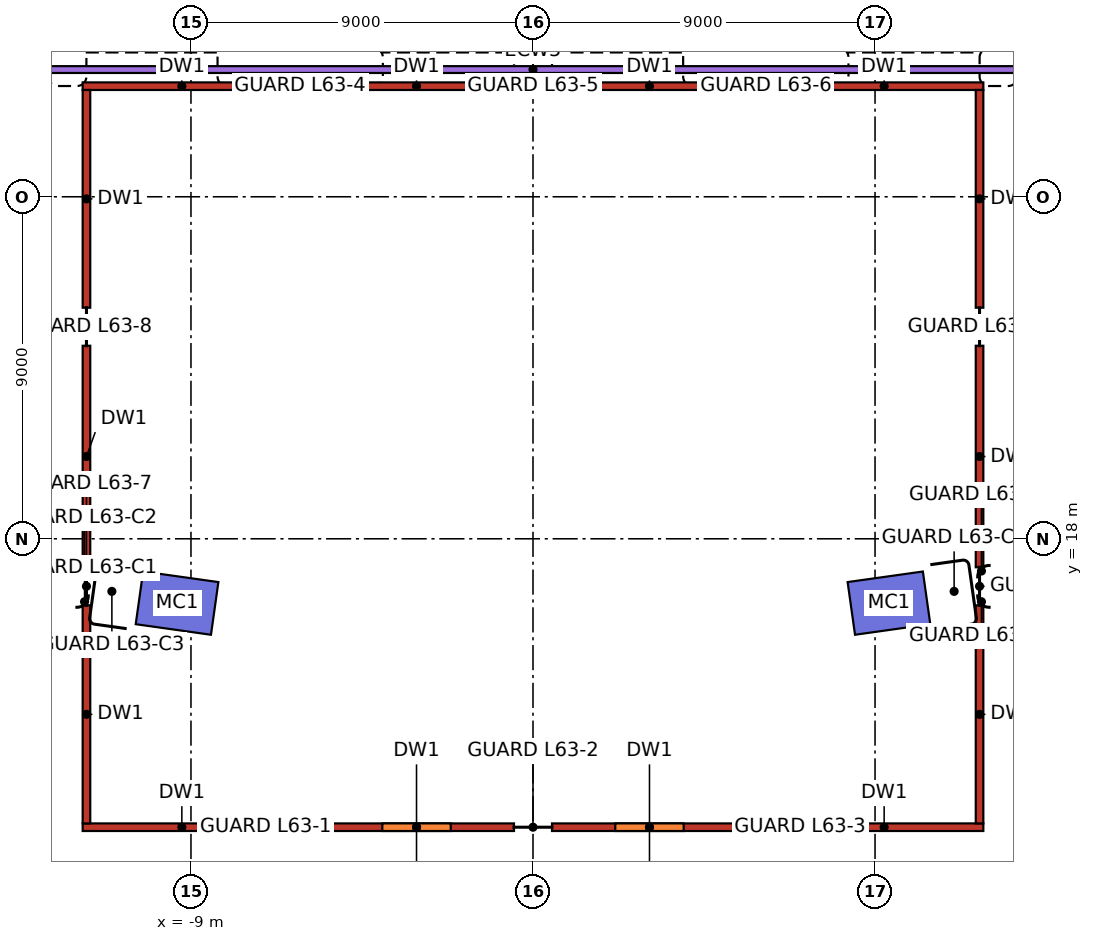
"""IFC4 building model, lengths in metres.
Left out: names, types, materials, properties, quantities, classifications, styles, units other than length and angle.
Written with IfcOpenShell. Run it as: python <this file> out.ifc"""

import sys

from ifc_helpers import new_model, si_unit, direction, frame, frame_2d, origin, origin_2d, place, context, subcontext, project, spatial, rectangle, hollow_rectangle, extrude, element, fill, save


model = new_model("IFC4")
c1 = context("Model", 3, precision=1e-05, world=origin(), true_north=direction((0.0, 1.0)))
c2 = subcontext(c1, "Body", "Model", "MODEL_VIEW")
j1 = project(units=[si_unit("LENGTHUNIT", "METRE"), si_unit("PLANEANGLEUNIT", "RADIAN")], contexts=[c1])
p1 = place(None, origin())
s1 = spatial("IfcSite", under=j1, at=p1, CompositionType="ELEMENT")
p2 = place(p1, origin())
s2 = spatial("IfcBuilding", under=s1, at=p2, CompositionType="ELEMENT")
p3 = place(p2, frame((0.0, 0.0, 262.2)))
s3 = spatial("IfcBuildingStorey", under=s2, at=p3, CompositionType="ELEMENT", Elevation=262.2)
for number, where, z_axis, x_axis in (
    (1, (-9.366, 16.306, 0.0), (0.0, 0.0, 1.0), (-0.99, 0.139, 0.0)),
    (2, (9.366, 16.306, 0.0), (0.0, 0.0, 1.0), (0.99, 0.139, 0.0)),
):
    element("IfcColumn", number, at=place(p3, frame(where, z_axis=z_axis, x_axis=x_axis)), inside=s3, PredefinedType="COLUMN", context=c2, shape_type="SweptSolid", body=[
        extrude(hollow_rectangle(XDim=2.0, YDim=1.4, WallThickness=0.06, at=origin_2d()), origin(), (0.0, 0.0, 1.0), 3.8),
    ])
for number, where, z_axis, x_axis in (
    (3, (-11.85, 10.41, 0.0), (0.0, 0.0, 1.0), (1.0, 0.0, 0.0)),
    (4, (-11.85, 29.91, 0.0), (0.0, 0.0, 1.0), (1.0, 0.0, 0.0)),
):
    element("IfcWall", number, at=place(p3, frame(where, z_axis=z_axis, x_axis=x_axis)), inside=s3, PredefinedType="PARTITIONING", context=c2, shape_type="SweptSolid", body=[
        extrude(rectangle(XDim=5.22, YDim=0.2, at=frame_2d((2.61, 0.0))), origin(), (0.0, 0.0, 1.0), 3.3),
    ])
p4 = place(p3, frame((-5.63, 10.41, 0.0), z_axis=(0.0, 0.0, 1.0), x_axis=(1.0, 0.0, 0.0)))
e5 = element("IfcWall", 5, at=p4, inside=s3, PredefinedType="PARTITIONING", context=c2, shape_type="SweptSolid", body=[
    extrude(rectangle(XDim=5.13, YDim=0.2, at=frame_2d((2.565, 0.0))), origin(), (0.0, 0.0, 1.0), 3.3),
])
p5 = place(p4, frame((1.665, 0.0, 0.0)))
e6 = element("IfcOpeningElement", 6, at=p5, cuts=e5, PredefinedType="OPENING", context=c2, shape_type="SweptSolid", body=[
    extrude(rectangle(XDim=1.8, YDim=2.1, at=frame_2d((0.9, 1.05))), frame((0.0, 0.1, 0.0), z_axis=(0.0, -1.0, 0.0), x_axis=(1.0, 0.0, 0.0)), (0.0, 0.0, 1.0), 0.2),
])
p6 = place(p3, frame((-5.63, 29.91, 0.0), z_axis=(0.0, 0.0, 1.0), x_axis=(1.0, 0.0, 0.0)))
e7 = element("IfcWall", 7, at=p6, inside=s3, PredefinedType="PARTITIONING", context=c2, shape_type="SweptSolid", body=[
    extrude(rectangle(XDim=5.13, YDim=0.2, at=frame_2d((2.565, 0.0))), origin(), (0.0, 0.0, 1.0), 3.3),
])
p7 = place(p3, frame((0.5, 10.41, 0.0), z_axis=(0.0, 0.0, 1.0), x_axis=(1.0, 0.0, 0.0)))
e8 = element("IfcWall", 8, at=p7, inside=s3, PredefinedType="PARTITIONING", context=c2, shape_type="SweptSolid", body=[
    extrude(rectangle(XDim=5.13, YDim=0.2, at=frame_2d((2.565, 0.0))), origin(), (0.0, 0.0, 1.0), 3.3),
])
p8 = place(p7, frame((1.665, 0.0, 0.0)))
e9 = element("IfcOpeningElement", 9, at=p8, cuts=e8, PredefinedType="OPENING", context=c2, shape_type="SweptSolid", body=[
    extrude(rectangle(XDim=1.8, YDim=2.1, at=frame_2d((0.9, 1.05))), frame((0.0, 0.1, 0.0), z_axis=(0.0, -1.0, 0.0), x_axis=(1.0, 0.0, 0.0)), (0.0, 0.0, 1.0), 0.2),
])
p9 = place(p3, frame((0.5, 29.91, 0.0), z_axis=(0.0, 0.0, 1.0), x_axis=(1.0, 0.0, 0.0)))
e10 = element("IfcWall", 10, at=p9, inside=s3, PredefinedType="PARTITIONING", context=c2, shape_type="SweptSolid", body=[
    extrude(rectangle(XDim=5.13, YDim=0.2, at=frame_2d((2.565, 0.0))), origin(), (0.0, 0.0, 1.0), 3.3),
])
for number, where, z_axis, x_axis in (
    (11, (6.63, 10.41, 0.0), (0.0, 0.0, 1.0), (1.0, 0.0, 0.0)),
    (12, (6.63, 29.91, 0.0), (0.0, 0.0, 1.0), (1.0, 0.0, 0.0)),
):
    element("IfcWall", number, at=place(p3, frame(where, z_axis=z_axis, x_axis=x_axis)), inside=s3, PredefinedType="PARTITIONING", context=c2, shape_type="SweptSolid", body=[
        extrude(rectangle(XDim=5.22, YDim=0.2, at=frame_2d((2.61, 0.0))), origin(), (0.0, 0.0, 1.0), 3.3),
    ])
for number, where, z_axis, x_axis in (
    (13, (-11.75, 10.51, 0.0), (0.0, 0.0, 1.0), (0.0, 1.0, 0.0)),
    (14, (11.75, 10.51, 0.0), (0.0, 0.0, 1.0), (0.0, 1.0, 0.0)),
):
    element("IfcWall", number, at=place(p3, frame(where, z_axis=z_axis, x_axis=x_axis)), inside=s3, PredefinedType="PARTITIONING", context=c2, shape_type="SweptSolid", body=[
        extrude(rectangle(XDim=5.74, YDim=0.2, at=frame_2d((2.87, 0.0))), origin(), (0.0, 0.0, 1.0), 3.3),
    ])
for number, where, z_axis, x_axis in (
    (15, (-11.75, 17.25, 0.0), (0.0, 0.0, 1.0), (0.0, 1.0, 0.0)),
    (16, (11.75, 17.25, 0.0), (0.0, 0.0, 1.0), (0.0, 1.0, 0.0)),
):
    element("IfcWall", number, at=place(p3, frame(where, z_axis=z_axis, x_axis=x_axis)), inside=s3, PredefinedType="PARTITIONING", context=c2, shape_type="SweptSolid", body=[
        extrude(rectangle(XDim=5.83, YDim=0.2, at=frame_2d((2.915, 0.0))), origin(), (0.0, 0.0, 1.0), 3.3),
    ])
for number, where, z_axis, x_axis in (
    (17, (-11.75, 24.08, 0.0), (0.0, 0.0, 1.0), (0.0, 1.0, 0.0)),
    (18, (11.75, 24.08, 0.0), (0.0, 0.0, 1.0), (0.0, 1.0, 0.0)),
):
    element("IfcWall", number, at=place(p3, frame(where, z_axis=z_axis, x_axis=x_axis)), inside=s3, PredefinedType="PARTITIONING", context=c2, shape_type="SweptSolid", body=[
        extrude(rectangle(XDim=5.73, YDim=0.2, at=frame_2d((2.865, 0.0))), origin(), (0.0, 0.0, 1.0), 3.3),
    ])
p10 = place(p5, frame((1.8, 0.0, 0.0), z_axis=(0.0, 0.0, 1.0), x_axis=(-1.0, 0.0, 0.0)))
e19 = element("IfcDoor", 19, at=p10, inside=s3, OperationType="DOUBLE_DOOR_SINGLE_SWING", PredefinedType="DOOR", context=c2, shape_type="SweptSolid", body=[
    extrude(rectangle(XDim=0.895, YDim=2.1, at=frame_2d((0.448, 1.05))), frame((0.0, 0.025, 0.0), z_axis=(0.0, -1.0, 0.0), x_axis=(1.0, 0.0, 0.0)), (0.0, 0.0, 1.0), 0.05),
    extrude(rectangle(XDim=0.895, YDim=2.1, at=frame_2d((1.353, 1.05))), frame((0.0, 0.025, 0.0), z_axis=(0.0, -1.0, 0.0), x_axis=(1.0, 0.0, 0.0)), (0.0, 0.0, 1.0), 0.05),
])
fill(e6, e19)
p11 = place(p8, frame((1.8, 0.0, 0.0), z_axis=(0.0, 0.0, 1.0), x_axis=(-1.0, 0.0, 0.0)))
e20 = element("IfcDoor", 20, at=p11, inside=s3, OperationType="DOUBLE_DOOR_SINGLE_SWING", PredefinedType="DOOR", context=c2, shape_type="SweptSolid", body=[
    extrude(rectangle(XDim=0.895, YDim=2.1, at=frame_2d((0.448, 1.05))), frame((0.0, 0.025, 0.0), z_axis=(0.0, -1.0, 0.0), x_axis=(1.0, 0.0, 0.0)), (0.0, 0.0, 1.0), 0.05),
    extrude(rectangle(XDim=0.895, YDim=2.1, at=frame_2d((1.353, 1.05))), frame((0.0, 0.025, 0.0), z_axis=(0.0, -1.0, 0.0), x_axis=(1.0, 0.0, 0.0)), (0.0, 0.0, 1.0), 0.05),
])
fill(e9, e20)
save(model, sys.argv[1])
